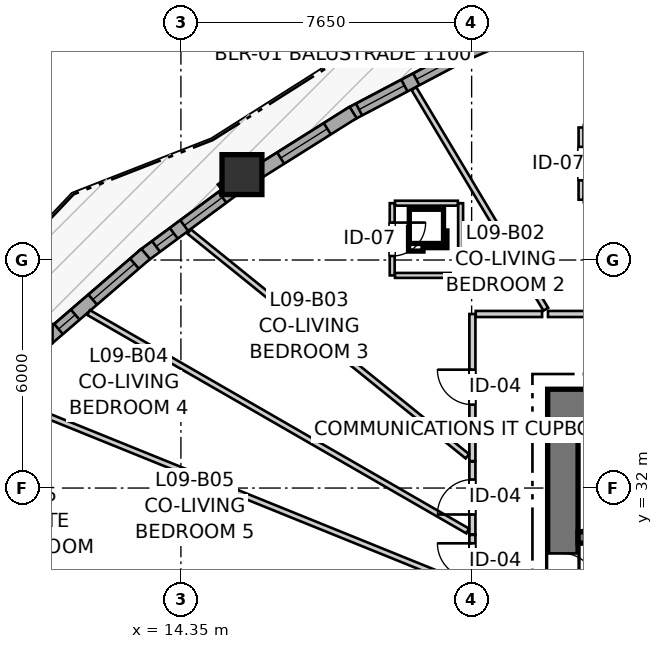
"""IFC4 building model, lengths in metres.
Left out: names, types, materials, properties, quantities, classifications, styles, units other than length and angle.
Written with IfcOpenShell. Run it as: python <this file> out.ifc"""

import sys

from ifc_helpers import new_model, si_unit, direction, frame, frame_2d, origin, origin_2d, place, context, subcontext, project, spatial, rectangle, i_section, extrude, source, transform, mapped, element, fill, save


model = new_model("IFC4")
c1 = context("Model", 3, precision=1e-05, world=origin(), true_north=direction((0.0, 1.0)))
c2 = subcontext(c1, "Body", "Model", "MODEL_VIEW")
j1 = project(units=[si_unit("LENGTHUNIT", "METRE"), si_unit("PLANEANGLEUNIT", "RADIAN")], contexts=[c1])
p1 = place(None, origin())
s1 = spatial("IfcSite", under=j1, at=p1, CompositionType="ELEMENT")
p2 = place(p1, origin())
s2 = spatial("IfcBuilding", under=s1, at=p2, CompositionType="ELEMENT")
p3 = place(p2, frame((0.0, 0.0, 33.4)))
s3 = spatial("IfcBuildingStorey", under=s2, at=p3, CompositionType="ELEMENT", Elevation=33.4)
p4 = place(p3, frame((36.7, 34.2, 0.0), z_axis=(0.0, 0.0, 1.0), x_axis=(-1.0, 0.0, 0.0)))
e1 = element("IfcWall", 1, at=p4, inside=s3, PredefinedType="SHEAR", context=c2, shape_type="SweptSolid", body=[
    extrude(rectangle(XDim=12.7, YDim=0.8, at=frame_2d((6.35, 0.0))), origin(), (0.0, 0.0, 1.0), 2.94),
])
p5 = place(p3, frame((24.4, 33.8, 0.0), z_axis=(0.0, 0.0, 1.0), x_axis=(0.0, -1.0, 0.0)))
e2 = element("IfcWall", 2, at=p5, inside=s3, PredefinedType="SHEAR", context=c2, shape_type="SweptSolid", body=[
    extrude(rectangle(XDim=15.6, YDim=0.8, at=frame_2d((7.8, 0.0))), origin(), (0.0, 0.0, 1.0), 2.94),
])
p6 = place(p5, frame((7.05, 0.0, 0.0)))
e3 = element("IfcOpeningElement", 3, at=p6, cuts=e2, PredefinedType="OPENING", context=c2, shape_type="SweptSolid", body=[
    extrude(rectangle(XDim=1.5, YDim=2.15, at=frame_2d((0.75, 1.075))), frame((0.0, 0.41, 0.0), z_axis=(0.0, -1.0, 0.0), x_axis=(1.0, 0.0, 0.0)), (0.0, 0.0, 1.0), 0.82),
])
p7 = place(p5, frame((3.52, 0.0, 0.0)))
e4 = element("IfcOpeningElement", 4, at=p7, cuts=e2, PredefinedType="OPENING", context=c2, shape_type="SweptSolid", body=[
    extrude(rectangle(XDim=0.86, YDim=2.05, at=frame_2d((0.43, 1.025))), frame((0.0, 0.41, 0.0), z_axis=(0.0, -1.0, 0.0), x_axis=(1.0, 0.0, 0.0)), (0.0, 0.0, 1.0), 0.82),
])
p8 = place(p5, frame((11.22, 0.0, 0.0)))
e5 = element("IfcOpeningElement", 5, at=p8, cuts=e2, PredefinedType="OPENING", context=c2, shape_type="SweptSolid", body=[
    extrude(rectangle(XDim=0.86, YDim=2.05, at=frame_2d((0.43, 1.025))), frame((0.0, 0.41, 0.0), z_axis=(0.0, -1.0, 0.0), x_axis=(1.0, 0.0, 0.0)), (0.0, 0.0, 1.0), 0.82),
])
p9 = place(p3, frame((24.8, 30.7, 0.0), z_axis=(0.0, 0.0, 1.0), x_axis=(1.0, 0.0, 0.0)))
e6 = element("IfcWall", 6, at=p9, inside=s3, PredefinedType="SHEAR", context=c2, shape_type="SweptSolid", body=[
    extrude(rectangle(XDim=11.1, YDim=0.3, at=frame_2d((5.55, 0.0))), origin(), (0.0, 0.0, 1.0), 2.94),
])
p10 = place(p9, frame((6.22, 0.0, 0.0)))
e7 = element("IfcOpeningElement", 7, at=p10, cuts=e6, PredefinedType="OPENING", context=c2, shape_type="SweptSolid", body=[
    extrude(rectangle(XDim=0.98, YDim=2.15, at=frame_2d((0.49, 1.075))), frame((0.0, 0.16, 0.0), z_axis=(0.0, -1.0, 0.0), x_axis=(1.0, 0.0, 0.0)), (0.0, 0.0, 1.0), 0.32),
])
p11 = place(p9, frame((9.15, 0.0, 0.0)))
e8 = element("IfcOpeningElement", 8, at=p11, cuts=e6, PredefinedType="OPENING", context=c2, shape_type="SweptSolid", body=[
    extrude(rectangle(XDim=1.15, YDim=2.15, at=frame_2d((0.575, 1.075))), frame((0.0, 0.16, 0.0), z_axis=(0.0, -1.0, 0.0), x_axis=(1.0, 0.0, 0.0)), (0.0, 0.0, 1.0), 0.32),
])
m1 = source(origin(), c2, "Body", "SweptSolid", [
    extrude(i_section(OverallWidth=0.409, OverallDepth=0.425, WebThickness=0.03, FlangeThickness=0.048, FilletRadius=0.015, at=origin_2d()), origin(), (0.0, 0.0, 1.0), 2.94),
])
p12 = place(p3, frame((21.683, 43.554, 0.0), z_axis=(0.0, 0.0, 1.0), x_axis=(1.0, 0.0, 0.0)))
e9 = element("IfcColumn", 9, at=p12, inside=s3, PredefinedType="PILASTER", context=c2, shape_type="MappedRepresentation", body=[
    mapped(m1, transform((0.0, 0.0, 0.0), x_axis=(1.0, 0.0, 0.0), y_axis=(0.0, 1.0, 0.0), z_axis=(0.0, 0.0, 1.0), scale=1.0)),
])
m2 = source(origin(), c2, "Body", "SweptSolid", [
    extrude(rectangle(XDim=1.05, YDim=1.05, at=origin_2d()), origin(), (0.0, 0.0, 1.0), 2.94),
])
p13 = place(p3, frame((15.956, 40.247, 0.0), z_axis=(0.0, 0.0, 1.0), x_axis=(1.0, 0.0, 0.0)))
e10 = element("IfcColumn", 10, at=p13, inside=s3, PredefinedType="COLUMN", context=c2, shape_type="MappedRepresentation", body=[
    mapped(m2, transform((0.0, 0.0, 0.0), x_axis=(1.0, 0.0, 0.0), y_axis=(0.0, 1.0, 0.0), z_axis=(0.0, 0.0, 1.0), scale=1.0)),
])
p14 = place(p3, frame((24.84, 44.735, 0.0), z_axis=(0.0, 0.0, 1.0), x_axis=(-0.917090935142, -0.398678086532, 0.0)))
e11 = element("IfcWall", 11, at=p14, inside=s3, PredefinedType="SOLIDWALL", context=c2, shape_type="SweptSolid", body=[
    extrude(rectangle(XDim=3.346, YDim=0.35, at=frame_2d((1.673, 0.0))), origin(), (0.0, 0.0, 1.0), 2.42),
])
p15 = place(p14, frame((1.108, 0.0, 0.82)))
e12 = element("IfcOpeningElement", 12, at=p15, cuts=e11, PredefinedType="OPENING", context=c2, shape_type="SweptSolid", body=[
    extrude(rectangle(XDim=1.15, YDim=1.2, at=frame_2d((0.575, 0.6))), frame((0.0, 0.185, 0.0), z_axis=(0.0, -1.0, 0.0), x_axis=(1.0, 0.0, 0.0)), (0.0, 0.0, 1.0), 0.37),
])
p16 = place(p3, frame((21.747, 43.39, 0.0), z_axis=(0.0, 0.0, 1.0), x_axis=(-0.88437802144, -0.46677137358, 0.0)))
e13 = element("IfcWall", 13, at=p16, inside=s3, PredefinedType="SOLIDWALL", context=c2, shape_type="SweptSolid", body=[
    extrude(rectangle(XDim=3.327, YDim=0.35, at=frame_2d((1.664, 0.0))), origin(), (0.0, 0.0, 1.0), 2.42),
])
p17 = place(p16, frame((0.311, 0.0, 0.82)))
e14 = element("IfcOpeningElement", 14, at=p17, cuts=e13, PredefinedType="OPENING", context=c2, shape_type="SweptSolid", body=[
    extrude(rectangle(XDim=1.05, YDim=1.45, at=frame_2d((0.525, 0.725))), frame((0.0, 0.185, 0.0), z_axis=(0.0, -1.0, 0.0), x_axis=(1.0, 0.0, 0.0)), (0.0, 0.0, 1.0), 0.37),
])
p18 = place(p16, frame((1.714, 0.0, 0.82)))
e15 = element("IfcOpeningElement", 15, at=p18, cuts=e13, PredefinedType="OPENING", context=c2, shape_type="SweptSolid", body=[
    extrude(rectangle(XDim=1.35, YDim=1.45, at=frame_2d((0.675, 0.725))), frame((0.0, 0.185, 0.0), z_axis=(0.0, -1.0, 0.0), x_axis=(1.0, 0.0, 0.0)), (0.0, 0.0, 1.0), 0.37),
])
p19 = place(p3, frame((18.882, 41.882, 0.0), z_axis=(0.0, 0.0, 1.0), x_axis=(-0.846428134238, -0.53250297048, 0.0)))
e16 = element("IfcWall", 16, at=p19, inside=s3, PredefinedType="SOLIDWALL", context=c2, shape_type="SweptSolid", body=[
    extrude(rectangle(XDim=3.047, YDim=0.35, at=frame_2d((1.523, 0.0))), origin(), (0.0, 0.0, 1.0), 2.42),
])
p20 = place(p19, frame((0.803, 0.0, 0.82)))
e17 = element("IfcOpeningElement", 17, at=p20, cuts=e16, PredefinedType="OPENING", context=c2, shape_type="SweptSolid", body=[
    extrude(rectangle(XDim=1.45, YDim=1.25, at=frame_2d((0.725, 0.625))), frame((0.0, 0.185, 0.0), z_axis=(0.0, -1.0, 0.0), x_axis=(1.0, 0.0, 0.0)), (0.0, 0.0, 1.0), 0.37),
])
p21 = place(p3, frame((15.819, 39.928, 0.0), z_axis=(0.0, 0.0, 1.0), x_axis=(-0.803825144674, -0.594865645999, 0.0)))
e18 = element("IfcWall", 18, at=p21, inside=s3, PredefinedType="SOLIDWALL", context=c2, shape_type="SweptSolid", body=[
    extrude(rectangle(XDim=3.066, YDim=0.35, at=frame_2d((1.533, 0.0))), origin(), (0.0, 0.0, 1.0), 2.42),
])
p22 = place(p21, frame((0.469, 0.0, 0.82)))
e19 = element("IfcOpeningElement", 19, at=p22, cuts=e18, PredefinedType="OPENING", context=c2, shape_type="SweptSolid", body=[
    extrude(rectangle(XDim=1.25, YDim=1.35, at=frame_2d((0.625, 0.675))), frame((0.0, 0.185, 0.0), z_axis=(0.0, -1.0, 0.0), x_axis=(1.0, 0.0, 0.0)), (0.0, 0.0, 1.0), 0.37),
])
p23 = place(p21, frame((2.062, 0.0, 0.82)))
e20 = element("IfcOpeningElement", 20, at=p23, cuts=e18, PredefinedType="OPENING", context=c2, shape_type="SweptSolid", body=[
    extrude(rectangle(XDim=0.58, YDim=1.35, at=frame_2d((0.29, 0.675))), frame((0.0, 0.185, 0.0), z_axis=(0.0, -1.0, 0.0), x_axis=(1.0, 0.0, 0.0)), (0.0, 0.0, 1.0), 0.37),
])
p24 = place(p3, frame((13.424, 38.16, 0.0), z_axis=(0.0, 0.0, 1.0), x_axis=(-0.757512075852, -0.652821150805, 0.0)))
e21 = element("IfcWall", 21, at=p24, inside=s3, PredefinedType="SOLIDWALL", context=c2, shape_type="SweptSolid", body=[
    extrude(rectangle(XDim=3.384, YDim=0.35, at=frame_2d((1.692, 0.0))), origin(), (0.0, 0.0, 1.0), 2.42),
])
p25 = place(p24, frame((0.392, 0.0, 0.82)))
e22 = element("IfcOpeningElement", 22, at=p25, cuts=e21, PredefinedType="OPENING", context=c2, shape_type="SweptSolid", body=[
    extrude(rectangle(XDim=1.45, YDim=1.25, at=frame_2d((0.725, 0.625))), frame((0.0, 0.185, 0.0), z_axis=(0.0, -1.0, 0.0), x_axis=(1.0, 0.0, 0.0)), (0.0, 0.0, 1.0), 0.37),
])
p26 = place(p24, frame((2.449, 0.0, 0.82)))
e23 = element("IfcOpeningElement", 23, at=p26, cuts=e21, PredefinedType="OPENING", context=c2, shape_type="SweptSolid", body=[
    extrude(rectangle(XDim=0.58, YDim=1.35, at=frame_2d((0.29, 0.675))), frame((0.0, 0.185, 0.0), z_axis=(0.0, -1.0, 0.0), x_axis=(1.0, 0.0, 0.0)), (0.0, 0.0, 1.0), 0.37),
])
p27 = place(p3, frame((22.02, 32.71, 0.0), z_axis=(0.0, 0.0, 1.0), x_axis=(0.0, 1.0, 0.0)))
e24 = element("IfcWall", 24, at=p27, inside=s3, PredefinedType="PARTITIONING", context=c2, shape_type="SweptSolid", body=[
    extrude(rectangle(XDim=3.87, YDim=0.16, at=frame_2d((1.935, 0.0))), origin(), (0.0, 0.0, 1.0), 2.94),
])
p28 = place(p27, frame((1.485, 0.0, 0.0)))
e25 = element("IfcOpeningElement", 25, at=p28, cuts=e24, PredefinedType="OPENING", context=c2, shape_type="SweptSolid", body=[
    extrude(rectangle(XDim=0.92, YDim=2.1, at=frame_2d((0.46, 1.05))), frame((0.0, 0.09, 0.0), z_axis=(0.0, -1.0, 0.0), x_axis=(1.0, 0.0, 0.0)), (0.0, 0.0, 1.0), 0.18),
])
p29 = place(p3, frame((24.009, 36.58, 0.0), z_axis=(0.0, 0.0, 1.0), x_axis=(1.0, 0.0, 0.0)))
e26 = element("IfcWall", 26, at=p29, inside=s3, PredefinedType="PARTITIONING", context=c2, shape_type="SweptSolid", body=[
    extrude(rectangle(XDim=3.822, YDim=0.16, at=frame_2d((1.911, 0.0))), origin(), (0.0, 0.0, 1.0), 2.548),
])
p30 = place(p29, frame((1.452, 0.0, 0.0)))
e27 = element("IfcOpeningElement", 27, at=p30, cuts=e26, PredefinedType="OPENING", context=c2, shape_type="SweptSolid", body=[
    extrude(rectangle(XDim=0.92, YDim=2.1, at=frame_2d((0.46, 1.05))), frame((0.0, 0.09, 0.0), z_axis=(0.0, -1.0, 0.0), x_axis=(1.0, 0.0, 0.0)), (0.0, 0.0, 1.0), 0.18),
])
p31 = place(p3, frame((22.02, 30.782, 0.0), z_axis=(0.0, 0.0, 1.0), x_axis=(0.0, 1.0, 0.0)))
e28 = element("IfcWall", 28, at=p31, inside=s3, PredefinedType="PARTITIONING", context=c2, shape_type="SweptSolid", body=[
    extrude(rectangle(XDim=1.913, YDim=0.16, at=frame_2d((0.957, 0.0))), origin(), (0.0, 0.0, 1.0), 2.94),
])
p32 = place(p31, frame((0.522, 0.0, 0.0)))
e29 = element("IfcOpeningElement", 29, at=p32, cuts=e28, PredefinedType="OPENING", context=c2, shape_type="SweptSolid", body=[
    extrude(rectangle(XDim=0.92, YDim=2.1, at=frame_2d((0.46, 1.05))), frame((0.0, 0.09, 0.0), z_axis=(0.0, -1.0, 0.0), x_axis=(1.0, 0.0, 0.0)), (0.0, 0.0, 1.0), 0.18),
])
p33 = place(p3, frame((24.879, 41.487, 0.0), z_axis=(0.0, 0.0, 1.0), x_axis=(0.0, -1.0, 0.0)))
e30 = element("IfcWall", 30, at=p33, inside=s3, PredefinedType="PARTITIONING", context=c2, shape_type="SweptSolid", body=[
    extrude(rectangle(XDim=1.9, YDim=0.13, at=frame_2d((0.95, 0.0))), origin(), (0.0, 0.0, 1.0), 2.94),
])
p34 = place(p33, frame((0.51, 0.0, 0.0)))
e31 = element("IfcOpeningElement", 31, at=p34, cuts=e30, PredefinedType="OPENING", context=c2, shape_type="SweptSolid", body=[
    extrude(rectangle(XDim=0.88, YDim=2.05, at=frame_2d((0.44, 1.025))), frame((0.0, 0.075, 0.0), z_axis=(0.0, -1.0, 0.0), x_axis=(1.0, 0.0, 0.0)), (0.0, 0.0, 1.0), 0.15),
])
p35 = place(p3, frame((19.91, 39.495, 0.0), z_axis=(0.0, 0.0, 1.0), x_axis=(0.0, -1.0, 0.0)))
e32 = element("IfcWall", 32, at=p35, inside=s3, PredefinedType="PARTITIONING", context=c2, shape_type="SweptSolid", body=[
    extrude(rectangle(XDim=1.9, YDim=0.13, at=frame_2d((0.95, 0.0))), origin(), (0.0, 0.0, 1.0), 2.94),
])
p36 = place(p35, frame((0.51, 0.0, 0.0)))
e33 = element("IfcOpeningElement", 33, at=p36, cuts=e32, PredefinedType="OPENING", context=c2, shape_type="SweptSolid", body=[
    extrude(rectangle(XDim=0.88, YDim=2.05, at=frame_2d((0.44, 1.025))), frame((0.0, 0.075, 0.0), z_axis=(0.0, -1.0, 0.0), x_axis=(1.0, 0.0, 0.0)), (0.0, 0.0, 1.0), 0.15),
])
p37 = place(p3, frame((22.02, 29.404, 0.0), z_axis=(0.0, 0.0, 1.0), x_axis=(0.0, 1.0, 0.0)))
e34 = element("IfcWall", 34, at=p37, inside=s3, PredefinedType="PARTITIONING", context=c2, shape_type="SweptSolid", body=[
    extrude(rectangle(XDim=1.363, YDim=0.16, at=frame_2d((0.682, 0.0))), origin(), (0.0, 0.0, 1.0), 2.94),
])
p38 = place(p37, frame((0.222, 0.0, 0.0)))
e35 = element("IfcOpeningElement", 35, at=p38, cuts=e34, PredefinedType="OPENING", context=c2, shape_type="SweptSolid", body=[
    extrude(rectangle(XDim=0.92, YDim=2.1, at=frame_2d((0.46, 1.05))), frame((0.0, 0.09, 0.0), z_axis=(0.0, -1.0, 0.0), x_axis=(1.0, 0.0, 0.0)), (0.0, 0.0, 1.0), 0.18),
])
p39 = place(p3, frame((5.242, 29.91, 0.0), z_axis=(0.0, 0.0, 1.0), x_axis=(0.988899381561, -0.148586719285, 0.0)))
e36 = element("IfcWall", 36, at=p39, inside=s3, PredefinedType="PARTITIONING", context=c2, shape_type="SweptSolid", body=[
    extrude(rectangle(XDim=13.864, YDim=0.145, at=frame_2d((6.932, 0.0))), origin(), (0.0, 0.0, 1.0), 2.94),
])
p40 = place(p3, frame((9.577, 34.41, 0.0), z_axis=(0.0, 0.0, 1.0), x_axis=(0.926920362809, -0.375258099194, 0.0)))
e37 = element("IfcWall", 37, at=p40, inside=s3, PredefinedType="PARTITIONING", context=c2, shape_type="SweptSolid", body=[
    extrude(rectangle(XDim=13.3, YDim=0.145, at=frame_2d((6.65, 0.0))), origin(), (0.0, 0.0, 1.0), 2.94),
])
p41 = place(p3, frame((11.92, 36.618, 0.0), z_axis=(0.0, 0.0, 1.0), x_axis=(0.866473494239, -0.499223080177, 0.0)))
e38 = element("IfcWall", 38, at=p41, inside=s3, PredefinedType="PARTITIONING", context=c2, shape_type="SweptSolid", body=[
    extrude(rectangle(XDim=11.514, YDim=0.145, at=frame_2d((5.757, 0.0))), origin(), (0.0, 0.0, 1.0), 2.94),
])
p42 = place(p3, frame((14.566, 38.751, 0.0), z_axis=(0.0, 0.0, 1.0), x_axis=(0.777881688073, -0.628410756879, 0.0)))
e39 = element("IfcWall", 39, at=p42, inside=s3, PredefinedType="PARTITIONING", context=c2, shape_type="SweptSolid", body=[
    extrude(rectangle(XDim=9.413, YDim=0.145, at=frame_2d((4.707, 0.0))), origin(), (0.0, 0.0, 1.0), 2.94),
])
p43 = place(p3, frame((20.481, 42.51, 0.0), z_axis=(0.0, 0.0, 1.0), x_axis=(0.513067331262, -0.858348363773, 0.0)))
e40 = element("IfcWall", 40, at=p43, inside=s3, PredefinedType="PARTITIONING", context=c2, shape_type="SweptSolid", body=[
    extrude(rectangle(XDim=6.765, YDim=0.145, at=frame_2d((3.382, 0.0))), origin(), (0.0, 0.0, 1.0), 2.94),
])
p44 = place(p3, frame((22.108, 36.58, 0.0), z_axis=(0.0, 0.0, 1.0), x_axis=(1.0, 0.0, 0.0)))
e41 = element("IfcWall", 41, at=p44, inside=s3, PredefinedType="PARTITIONING", context=c2, shape_type="SweptSolid", body=[
    extrude(rectangle(XDim=1.746, YDim=0.16, at=frame_2d((0.873, 0.0))), origin(), (0.0, 0.0, 1.0), 2.548),
])
p45 = place(p3, frame((21.71, 37.595, 0.0), z_axis=(0.0, 0.0, 1.0), x_axis=(0.0, 1.0, 0.0)))
e42 = element("IfcWall", 42, at=p45, inside=s3, PredefinedType="PARTITIONING", context=c2, shape_type="SweptSolid", body=[
    extrude(rectangle(XDim=1.9, YDim=0.13, at=frame_2d((0.95, 0.0))), origin(), (0.0, 0.0, 1.0), 2.94),
])
for number, where, z_axis, x_axis in (
    (43, (19.983, 39.495, 0.0), (0.0, 0.0, 1.0), (1.0, 0.0, 0.0)),
    (44, (19.983, 37.595, 0.0), (0.0, 0.0, 1.0), (1.0, 0.0, 0.0)),
):
    element("IfcWall", number, at=place(p3, frame(where, z_axis=z_axis, x_axis=x_axis)), inside=s3, PredefinedType="PARTITIONING", context=c2, shape_type="SweptSolid", body=[
        extrude(rectangle(XDim=1.654, YDim=0.13, at=frame_2d((0.827, 0.0))), origin(), (0.0, 0.0, 1.0), 2.94),
    ])
p46 = place(p3, frame((24.952, 39.587, 0.0), z_axis=(0.0, 0.0, 1.0), x_axis=(1.0, 0.0, 0.0)))
e45 = element("IfcWall", 45, at=p46, inside=s3, PredefinedType="PARTITIONING", context=c2, shape_type="SweptSolid", body=[
    extrude(rectangle(XDim=1.727, YDim=0.13, at=frame_2d((0.864, 0.0))), origin(), (0.0, 0.0, 1.0), 2.94),
])
p47 = place(p3, frame((24.952, 41.487, 0.0), z_axis=(0.0, 0.0, 1.0), x_axis=(1.0, 0.0, 0.0)))
e46 = element("IfcWall", 46, at=p47, inside=s3, PredefinedType="PARTITIONING", context=c2, shape_type="SweptSolid", body=[
    extrude(rectangle(XDim=1.59, YDim=0.13, at=frame_2d((0.795, 0.0))), origin(), (0.0, 0.0, 1.0), 2.508),
])
m3 = source(origin(), c2, "Body", "SweptSolid", [
    extrude(rectangle(XDim=1.05, YDim=1.45, at=frame_2d((0.525, 0.725))), frame((0.0, 0.03, 0.0), z_axis=(0.0, -1.0, 0.0), x_axis=(1.0, 0.0, 0.0)), (0.0, 0.0, 1.0), 0.06),
])
p48 = place(p17, origin())
e47 = element("IfcWindow", 47, at=p48, inside=s3, PartitioningType="SINGLE_PANEL", PredefinedType="WINDOW", context=c2, shape_type="MappedRepresentation", body=[
    mapped(m3, transform((0.0, 0.0, 0.0), x_axis=(1.0, 0.0, 0.0), y_axis=(0.0, 1.0, 0.0), z_axis=(0.0, 0.0, 1.0), scale=1.0)),
])
fill(e14, e47)
m4 = source(origin(), c2, "Body", "SweptSolid", [
    extrude(rectangle(XDim=1.35, YDim=1.45, at=frame_2d((0.675, 0.725))), frame((0.0, 0.03, 0.0), z_axis=(0.0, -1.0, 0.0), x_axis=(1.0, 0.0, 0.0)), (0.0, 0.0, 1.0), 0.06),
])
p49 = place(p18, origin())
e48 = element("IfcWindow", 48, at=p49, inside=s3, PartitioningType="SINGLE_PANEL", PredefinedType="WINDOW", context=c2, shape_type="MappedRepresentation", body=[
    mapped(m4, transform((0.0, 0.0, 0.0), x_axis=(1.0, 0.0, 0.0), y_axis=(0.0, 1.0, 0.0), z_axis=(0.0, 0.0, 1.0), scale=1.0)),
])
fill(e15, e48)
m5 = source(origin(), c2, "Body", "SweptSolid", [
    extrude(rectangle(XDim=1.45, YDim=1.25, at=frame_2d((0.725, 0.625))), frame((0.0, 0.03, 0.0), z_axis=(0.0, -1.0, 0.0), x_axis=(1.0, 0.0, 0.0)), (0.0, 0.0, 1.0), 0.06),
])
p50 = place(p20, origin())
e49 = element("IfcWindow", 49, at=p50, inside=s3, PartitioningType="SINGLE_PANEL", PredefinedType="WINDOW", context=c2, shape_type="MappedRepresentation", body=[
    mapped(m5, transform((0.0, 0.0, 0.0), x_axis=(1.0, 0.0, 0.0), y_axis=(0.0, 1.0, 0.0), z_axis=(0.0, 0.0, 1.0), scale=1.0)),
])
fill(e17, e49)
m6 = source(origin(), c2, "Body", "SweptSolid", [
    extrude(rectangle(XDim=1.25, YDim=1.35, at=frame_2d((0.625, 0.675))), frame((0.0, 0.03, 0.0), z_axis=(0.0, -1.0, 0.0), x_axis=(1.0, 0.0, 0.0)), (0.0, 0.0, 1.0), 0.06),
])
p51 = place(p22, origin())
e50 = element("IfcWindow", 50, at=p51, inside=s3, PartitioningType="SINGLE_PANEL", PredefinedType="WINDOW", context=c2, shape_type="MappedRepresentation", body=[
    mapped(m6, transform((0.0, 0.0, 0.0), x_axis=(1.0, 0.0, 0.0), y_axis=(0.0, 1.0, 0.0), z_axis=(0.0, 0.0, 1.0), scale=1.0)),
])
fill(e19, e50)
m7 = source(origin(), c2, "Body", "SweptSolid", [
    extrude(rectangle(XDim=0.58, YDim=1.35, at=frame_2d((0.29, 0.675))), frame((0.0, 0.03, 0.0), z_axis=(0.0, -1.0, 0.0), x_axis=(1.0, 0.0, 0.0)), (0.0, 0.0, 1.0), 0.06),
])
p52 = place(p23, origin())
e51 = element("IfcWindow", 51, at=p52, inside=s3, PartitioningType="SINGLE_PANEL", PredefinedType="WINDOW", context=c2, shape_type="MappedRepresentation", body=[
    mapped(m7, transform((0.0, 0.0, 0.0), x_axis=(1.0, 0.0, 0.0), y_axis=(0.0, 1.0, 0.0), z_axis=(0.0, 0.0, 1.0), scale=1.0)),
])
fill(e20, e51)
p53 = place(p25, origin())
e52 = element("IfcWindow", 52, at=p53, inside=s3, PartitioningType="SINGLE_PANEL", PredefinedType="WINDOW", context=c2, shape_type="MappedRepresentation", body=[
    mapped(m5, transform((0.0, 0.0, 0.0), x_axis=(1.0, 0.0, 0.0), y_axis=(0.0, 1.0, 0.0), z_axis=(0.0, 0.0, 1.0), scale=1.0)),
])
fill(e22, e52)
p54 = place(p26, origin())
e53 = element("IfcWindow", 53, at=p54, inside=s3, PartitioningType="SINGLE_PANEL", PredefinedType="WINDOW", context=c2, shape_type="MappedRepresentation", body=[
    mapped(m7, transform((0.0, 0.0, 0.0), x_axis=(1.0, 0.0, 0.0), y_axis=(0.0, 1.0, 0.0), z_axis=(0.0, 0.0, 1.0), scale=1.0)),
])
fill(e23, e53)
m8 = source(origin(), c2, "Body", "SweptSolid", [
    extrude(rectangle(XDim=0.86, YDim=2.05, at=frame_2d((0.43, 1.025))), frame((0.0, 0.025, 0.0), z_axis=(0.0, -1.0, 0.0), x_axis=(1.0, 0.0, 0.0)), (0.0, 0.0, 1.0), 0.05),
])
p55 = place(p7, origin())
e54 = element("IfcDoor", 54, at=p55, inside=s3, OperationType="SINGLE_SWING_RIGHT", PredefinedType="DOOR", context=c2, shape_type="MappedRepresentation", body=[
    mapped(m8, transform((0.0, 0.0, 0.0), x_axis=(1.0, 0.0, 0.0), y_axis=(0.0, 1.0, 0.0), z_axis=(0.0, 0.0, 1.0), scale=1.0)),
])
fill(e4, e54)
m9 = source(origin(), c2, "Body", "SweptSolid", [
    extrude(rectangle(XDim=0.92, YDim=2.1, at=frame_2d((0.46, 1.05))), frame((0.0, 0.025, 0.0), z_axis=(0.0, -1.0, 0.0), x_axis=(1.0, 0.0, 0.0)), (0.0, 0.0, 1.0), 0.05),
])
p56 = place(p28, origin())
e55 = element("IfcDoor", 55, at=p56, inside=s3, OperationType="SINGLE_SWING_RIGHT", PredefinedType="DOOR", context=c2, shape_type="MappedRepresentation", body=[
    mapped(m9, transform((0.0, 0.0, 0.0), x_axis=(1.0, 0.0, 0.0), y_axis=(0.0, 1.0, 0.0), z_axis=(0.0, 0.0, 1.0), scale=1.0)),
])
fill(e25, e55)
p57 = place(p32, origin())
e56 = element("IfcDoor", 56, at=p57, inside=s3, OperationType="SINGLE_SWING_LEFT", PredefinedType="DOOR", context=c2, shape_type="MappedRepresentation", body=[
    mapped(m9, transform((0.0, 0.0, 0.0), x_axis=(1.0, 0.0, 0.0), y_axis=(0.0, 1.0, 0.0), z_axis=(0.0, 0.0, 1.0), scale=1.0)),
])
fill(e29, e56)
m10 = source(origin(), c2, "Body", "SweptSolid", [
    extrude(rectangle(XDim=0.88, YDim=2.05, at=frame_2d((0.44, 1.025))), frame((0.0, 0.025, 0.0), z_axis=(0.0, -1.0, 0.0), x_axis=(1.0, 0.0, 0.0)), (0.0, 0.0, 1.0), 0.05),
])
p58 = place(p34, origin())
e57 = element("IfcDoor", 57, at=p58, inside=s3, OperationType="SINGLE_SWING_RIGHT", PredefinedType="DOOR", context=c2, shape_type="MappedRepresentation", body=[
    mapped(m10, transform((0.0, 0.0, 0.0), x_axis=(1.0, 0.0, 0.0), y_axis=(0.0, 1.0, 0.0), z_axis=(0.0, 0.0, 1.0), scale=1.0)),
])
fill(e31, e57)
p59 = place(p36, origin())
e58 = element("IfcDoor", 58, at=p59, inside=s3, OperationType="SINGLE_SWING_LEFT", PredefinedType="DOOR", context=c2, shape_type="MappedRepresentation", body=[
    mapped(m10, transform((0.0, 0.0, 0.0), x_axis=(1.0, 0.0, 0.0), y_axis=(0.0, 1.0, 0.0), z_axis=(0.0, 0.0, 1.0), scale=1.0)),
])
fill(e33, e58)
p60 = place(p38, origin())
e59 = element("IfcDoor", 59, at=p60, inside=s3, OperationType="SINGLE_SWING_RIGHT", PredefinedType="DOOR", context=c2, shape_type="MappedRepresentation", body=[
    mapped(m9, transform((0.0, 0.0, 0.0), x_axis=(1.0, 0.0, 0.0), y_axis=(0.0, 1.0, 0.0), z_axis=(0.0, 0.0, 1.0), scale=1.0)),
])
fill(e35, e59)
save(model, sys.argv[1])
